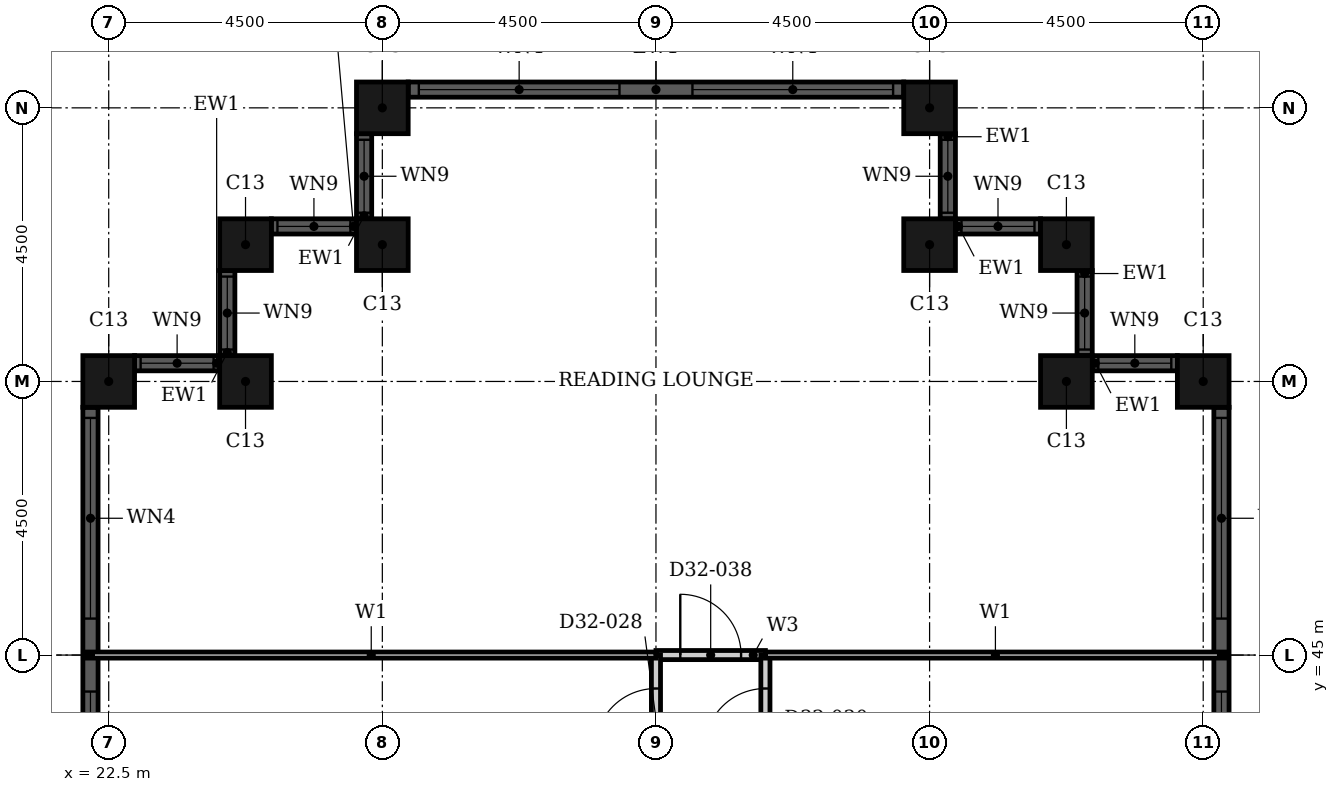
"""IFC4 building model, lengths in metres.
Left out: names, types, materials, properties, quantities, classifications, styles, units other than length and angle.
Written with IfcOpenShell. Run it as: python <this file> out.ifc"""

import sys

from ifc_helpers import new_model, si_unit, direction, frame, frame_2d, origin, origin_2d, place, context, subcontext, project, spatial, rectangle, hollow_rectangle, extrude, element, fill, save


model = new_model("IFC4")
c1 = context("Model", 3, precision=1e-05, world=origin(), true_north=direction((0.0, 1.0)))
c2 = subcontext(c1, "Body", "Model", "MODEL_VIEW")
j1 = project(units=[si_unit("LENGTHUNIT", "METRE"), si_unit("PLANEANGLEUNIT", "RADIAN")], contexts=[c1])
p1 = place(None, origin())
s1 = spatial("IfcSite", under=j1, at=p1, CompositionType="ELEMENT")
p2 = place(p1, origin())
s2 = spatial("IfcBuilding", under=s1, at=p2, CompositionType="ELEMENT")
p3 = place(p2, frame((0.0, 0.0, 129.6)))
s3 = spatial("IfcBuildingStorey", under=s2, at=p3, CompositionType="ELEMENT", Elevation=129.6)
for number, where, z_axis, x_axis in (
    (1, (40.5, 49.5, 0.0), (0.0, 0.0, 1.0), (1.0, 0.0, 0.0)),
    (2, (38.25, 49.5, 0.0), (0.0, 0.0, 1.0), (1.0, 0.0, 0.0)),
    (3, (38.25, 51.75, 0.0), (0.0, 0.0, 1.0), (1.0, 0.0, 0.0)),
    (4, (36.0, 51.75, 0.0), (0.0, 0.0, 1.0), (1.0, 0.0, 0.0)),
    (5, (36.0, 54.0, 0.0), (0.0, 0.0, 1.0), (1.0, 0.0, 0.0)),
    (6, (27.0, 54.0, 0.0), (0.0, 0.0, 1.0), (1.0, 0.0, 0.0)),
    (7, (27.0, 51.75, 0.0), (0.0, 0.0, 1.0), (1.0, 0.0, 0.0)),
    (8, (24.75, 51.75, 0.0), (0.0, 0.0, 1.0), (1.0, 0.0, 0.0)),
    (9, (24.75, 49.5, 0.0), (0.0, 0.0, 1.0), (1.0, 0.0, 0.0)),
    (10, (22.5, 49.5, 0.0), (0.0, 0.0, 1.0), (1.0, 0.0, 0.0)),
):
    element("IfcColumn", number, at=place(p3, frame(where, z_axis=z_axis, x_axis=x_axis)), inside=s3, PredefinedType="COLUMN", context=c2, shape_type="SweptSolid", body=[
        extrude(hollow_rectangle(XDim=0.85, YDim=0.85, WallThickness=0.026, at=origin_2d()), origin(), (0.0, 0.0, 1.0), 3.6),
    ])
p4 = place(p3, frame((40.8, 40.925, 0.0), z_axis=(0.0, 0.0, 1.0), x_axis=(0.0, 1.0, 0.0)))
e11 = element("IfcWall", 11, at=p4, inside=s3, PredefinedType="SOLIDWALL", context=c2, shape_type="SweptSolid", body=[
    extrude(rectangle(XDim=8.15, YDim=0.25, at=frame_2d((4.075, 0.0))), origin(), (0.0, 0.0, 1.0), 3.6),
])
p5 = place(p4, frame((0.175, 0.0, 0.9)))
e12 = element("IfcOpeningElement", 12, at=p5, cuts=e11, PredefinedType="OPENING", context=c2, shape_type="SweptSolid", body=[
    extrude(rectangle(XDim=3.3, YDim=2.08, at=frame_2d((1.65, 1.04))), frame((0.0, 0.135, 0.0), z_axis=(0.0, -1.0, 0.0), x_axis=(1.0, 0.0, 0.0)), (0.0, 0.0, 1.0), 0.27),
])
p6 = place(p4, frame((4.675, 0.0, 0.9)))
e13 = element("IfcOpeningElement", 13, at=p6, cuts=e11, PredefinedType="OPENING", context=c2, shape_type="SweptSolid", body=[
    extrude(rectangle(XDim=3.3, YDim=2.08, at=frame_2d((1.65, 1.04))), frame((0.0, 0.135, 0.0), z_axis=(0.0, -1.0, 0.0), x_axis=(1.0, 0.0, 0.0)), (0.0, 0.0, 1.0), 0.27),
])
p7 = place(p3, frame((40.075, 49.8, 0.0), z_axis=(0.0, 0.0, 1.0), x_axis=(-1.0, 0.0, 0.0)))
e14 = element("IfcWall", 14, at=p7, inside=s3, PredefinedType="SOLIDWALL", context=c2, shape_type="SweptSolid", body=[
    extrude(rectangle(XDim=1.4, YDim=0.25, at=frame_2d((0.7, 0.0))), origin(), (0.0, 0.0, 1.0), 3.6),
])
p8 = place(p7, frame((0.1, 0.0, 0.9)))
e15 = element("IfcOpeningElement", 15, at=p8, cuts=e14, PredefinedType="OPENING", context=c2, shape_type="SweptSolid", body=[
    extrude(rectangle(XDim=1.2, YDim=2.08, at=frame_2d((0.6, 1.04))), frame((0.0, 0.135, 0.0), z_axis=(0.0, -1.0, 0.0), x_axis=(1.0, 0.0, 0.0)), (0.0, 0.0, 1.0), 0.27),
])
p9 = place(p3, frame((38.55, 49.925, 0.0), z_axis=(0.0, 0.0, 1.0), x_axis=(0.0, 1.0, 0.0)))
e16 = element("IfcWall", 16, at=p9, inside=s3, PredefinedType="SOLIDWALL", context=c2, shape_type="SweptSolid", body=[
    extrude(rectangle(XDim=1.4, YDim=0.25, at=frame_2d((0.7, 0.0))), origin(), (0.0, 0.0, 1.0), 3.6),
])
p10 = place(p9, frame((0.1, 0.0, 0.9)))
e17 = element("IfcOpeningElement", 17, at=p10, cuts=e16, PredefinedType="OPENING", context=c2, shape_type="SweptSolid", body=[
    extrude(rectangle(XDim=1.2, YDim=2.08, at=frame_2d((0.6, 1.04))), frame((0.0, 0.135, 0.0), z_axis=(0.0, -1.0, 0.0), x_axis=(1.0, 0.0, 0.0)), (0.0, 0.0, 1.0), 0.27),
])
p11 = place(p3, frame((37.825, 52.05, 0.0), z_axis=(0.0, 0.0, 1.0), x_axis=(-1.0, 0.0, 0.0)))
e18 = element("IfcWall", 18, at=p11, inside=s3, PredefinedType="SOLIDWALL", context=c2, shape_type="SweptSolid", body=[
    extrude(rectangle(XDim=1.4, YDim=0.25, at=frame_2d((0.7, 0.0))), origin(), (0.0, 0.0, 1.0), 3.6),
])
p12 = place(p11, frame((0.1, 0.0, 0.9)))
e19 = element("IfcOpeningElement", 19, at=p12, cuts=e18, PredefinedType="OPENING", context=c2, shape_type="SweptSolid", body=[
    extrude(rectangle(XDim=1.2, YDim=2.08, at=frame_2d((0.6, 1.04))), frame((0.0, 0.135, 0.0), z_axis=(0.0, -1.0, 0.0), x_axis=(1.0, 0.0, 0.0)), (0.0, 0.0, 1.0), 0.27),
])
p13 = place(p3, frame((36.3, 52.175, 0.0), z_axis=(0.0, 0.0, 1.0), x_axis=(0.0, 1.0, 0.0)))
e20 = element("IfcWall", 20, at=p13, inside=s3, PredefinedType="SOLIDWALL", context=c2, shape_type="SweptSolid", body=[
    extrude(rectangle(XDim=1.4, YDim=0.25, at=frame_2d((0.7, 0.0))), origin(), (0.0, 0.0, 1.0), 3.6),
])
p14 = place(p13, frame((0.1, 0.0, 0.9)))
e21 = element("IfcOpeningElement", 21, at=p14, cuts=e20, PredefinedType="OPENING", context=c2, shape_type="SweptSolid", body=[
    extrude(rectangle(XDim=1.2, YDim=2.08, at=frame_2d((0.6, 1.04))), frame((0.0, 0.135, 0.0), z_axis=(0.0, -1.0, 0.0), x_axis=(1.0, 0.0, 0.0)), (0.0, 0.0, 1.0), 0.27),
])
p15 = place(p3, frame((35.575, 54.3, 0.0), z_axis=(0.0, 0.0, 1.0), x_axis=(-1.0, 0.0, 0.0)))
e22 = element("IfcWall", 22, at=p15, inside=s3, PredefinedType="SOLIDWALL", context=c2, shape_type="SweptSolid", body=[
    extrude(rectangle(XDim=8.15, YDim=0.25, at=frame_2d((4.075, 0.0))), origin(), (0.0, 0.0, 1.0), 3.6),
])
p16 = place(p15, frame((0.175, 0.0, 0.9)))
e23 = element("IfcOpeningElement", 23, at=p16, cuts=e22, PredefinedType="OPENING", context=c2, shape_type="SweptSolid", body=[
    extrude(rectangle(XDim=3.3, YDim=2.08, at=frame_2d((1.65, 1.04))), frame((0.0, 0.135, 0.0), z_axis=(0.0, -1.0, 0.0), x_axis=(1.0, 0.0, 0.0)), (0.0, 0.0, 1.0), 0.27),
])
p17 = place(p15, frame((4.675, 0.0, 0.9)))
e24 = element("IfcOpeningElement", 24, at=p17, cuts=e22, PredefinedType="OPENING", context=c2, shape_type="SweptSolid", body=[
    extrude(rectangle(XDim=3.3, YDim=2.08, at=frame_2d((1.65, 1.04))), frame((0.0, 0.135, 0.0), z_axis=(0.0, -1.0, 0.0), x_axis=(1.0, 0.0, 0.0)), (0.0, 0.0, 1.0), 0.27),
])
p18 = place(p3, frame((26.7, 53.575, 0.0), z_axis=(0.0, 0.0, 1.0), x_axis=(0.0, -1.0, 0.0)))
e25 = element("IfcWall", 25, at=p18, inside=s3, PredefinedType="SOLIDWALL", context=c2, shape_type="SweptSolid", body=[
    extrude(rectangle(XDim=1.4, YDim=0.25, at=frame_2d((0.7, 0.0))), origin(), (0.0, 0.0, 1.0), 3.6),
])
p19 = place(p18, frame((0.1, 0.0, 0.9)))
e26 = element("IfcOpeningElement", 26, at=p19, cuts=e25, PredefinedType="OPENING", context=c2, shape_type="SweptSolid", body=[
    extrude(rectangle(XDim=1.2, YDim=2.08, at=frame_2d((0.6, 1.04))), frame((0.0, 0.135, 0.0), z_axis=(0.0, -1.0, 0.0), x_axis=(1.0, 0.0, 0.0)), (0.0, 0.0, 1.0), 0.27),
])
p20 = place(p3, frame((26.575, 52.05, 0.0), z_axis=(0.0, 0.0, 1.0), x_axis=(-1.0, 0.0, 0.0)))
e27 = element("IfcWall", 27, at=p20, inside=s3, PredefinedType="SOLIDWALL", context=c2, shape_type="SweptSolid", body=[
    extrude(rectangle(XDim=1.4, YDim=0.25, at=frame_2d((0.7, 0.0))), origin(), (0.0, 0.0, 1.0), 3.6),
])
p21 = place(p20, frame((0.1, 0.0, 0.9)))
e28 = element("IfcOpeningElement", 28, at=p21, cuts=e27, PredefinedType="OPENING", context=c2, shape_type="SweptSolid", body=[
    extrude(rectangle(XDim=1.2, YDim=2.08, at=frame_2d((0.6, 1.04))), frame((0.0, 0.135, 0.0), z_axis=(0.0, -1.0, 0.0), x_axis=(1.0, 0.0, 0.0)), (0.0, 0.0, 1.0), 0.27),
])
p22 = place(p3, frame((24.45, 51.325, 0.0), z_axis=(0.0, 0.0, 1.0), x_axis=(0.0, -1.0, 0.0)))
e29 = element("IfcWall", 29, at=p22, inside=s3, PredefinedType="SOLIDWALL", context=c2, shape_type="SweptSolid", body=[
    extrude(rectangle(XDim=1.4, YDim=0.25, at=frame_2d((0.7, 0.0))), origin(), (0.0, 0.0, 1.0), 3.6),
])
p23 = place(p22, frame((0.1, 0.0, 0.9)))
e30 = element("IfcOpeningElement", 30, at=p23, cuts=e29, PredefinedType="OPENING", context=c2, shape_type="SweptSolid", body=[
    extrude(rectangle(XDim=1.2, YDim=2.08, at=frame_2d((0.6, 1.04))), frame((0.0, 0.135, 0.0), z_axis=(0.0, -1.0, 0.0), x_axis=(1.0, 0.0, 0.0)), (0.0, 0.0, 1.0), 0.27),
])
p24 = place(p3, frame((24.325, 49.8, 0.0), z_axis=(0.0, 0.0, 1.0), x_axis=(-1.0, 0.0, 0.0)))
e31 = element("IfcWall", 31, at=p24, inside=s3, PredefinedType="SOLIDWALL", context=c2, shape_type="SweptSolid", body=[
    extrude(rectangle(XDim=1.4, YDim=0.25, at=frame_2d((0.7, 0.0))), origin(), (0.0, 0.0, 1.0), 3.6),
])
p25 = place(p24, frame((0.1, 0.0, 0.9)))
e32 = element("IfcOpeningElement", 32, at=p25, cuts=e31, PredefinedType="OPENING", context=c2, shape_type="SweptSolid", body=[
    extrude(rectangle(XDim=1.2, YDim=2.08, at=frame_2d((0.6, 1.04))), frame((0.0, 0.135, 0.0), z_axis=(0.0, -1.0, 0.0), x_axis=(1.0, 0.0, 0.0)), (0.0, 0.0, 1.0), 0.27),
])
p26 = place(p3, frame((22.2, 49.075, 0.0), z_axis=(0.0, 0.0, 1.0), x_axis=(0.0, -1.0, 0.0)))
e33 = element("IfcWall", 33, at=p26, inside=s3, PredefinedType="SOLIDWALL", context=c2, shape_type="SweptSolid", body=[
    extrude(rectangle(XDim=8.15, YDim=0.25, at=frame_2d((4.075, 0.0))), origin(), (0.0, 0.0, 1.0), 3.6),
])
p27 = place(p26, frame((0.175, 0.0, 0.9)))
e34 = element("IfcOpeningElement", 34, at=p27, cuts=e33, PredefinedType="OPENING", context=c2, shape_type="SweptSolid", body=[
    extrude(rectangle(XDim=3.3, YDim=2.08, at=frame_2d((1.65, 1.04))), frame((0.0, 0.135, 0.0), z_axis=(0.0, -1.0, 0.0), x_axis=(1.0, 0.0, 0.0)), (0.0, 0.0, 1.0), 0.27),
])
p28 = place(p26, frame((4.675, 0.0, 0.9)))
e35 = element("IfcOpeningElement", 35, at=p28, cuts=e33, PredefinedType="OPENING", context=c2, shape_type="SweptSolid", body=[
    extrude(rectangle(XDim=3.3, YDim=2.08, at=frame_2d((1.65, 1.04))), frame((0.0, 0.135, 0.0), z_axis=(0.0, -1.0, 0.0), x_axis=(1.0, 0.0, 0.0)), (0.0, 0.0, 1.0), 0.27),
])
p29 = place(p3, frame((31.5, 45.0, 0.0), z_axis=(0.0, 0.0, 1.0), x_axis=(1.0, 0.0, 0.0)))
e36 = element("IfcWall", 36, at=p29, inside=s3, PredefinedType="PARTITIONING", context=c2, shape_type="SweptSolid", body=[
    extrude(rectangle(XDim=1.8, YDim=0.15, at=frame_2d((0.9, 0.0))), origin(), (0.0, 0.0, 1.0), 3.3),
])
p30 = place(p29, frame((0.4, 0.0, 0.0)))
e37 = element("IfcOpeningElement", 37, at=p30, cuts=e36, PredefinedType="OPENING", context=c2, shape_type="SweptSolid", body=[
    extrude(rectangle(XDim=1.0, YDim=2.1, at=frame_2d((0.5, 1.05))), frame((0.0, 0.085, 0.0), z_axis=(0.0, -1.0, 0.0), x_axis=(1.0, 0.0, 0.0)), (0.0, 0.0, 1.0), 0.17),
])
p31 = place(p3, frame((31.5, 33.3, 0.0), z_axis=(0.0, 0.0, 1.0), x_axis=(0.0, 1.0, 0.0)))
e38 = element("IfcWall", 38, at=p31, inside=s3, PredefinedType="PARTITIONING", context=c2, shape_type="SweptSolid", body=[
    extrude(rectangle(XDim=11.7, YDim=0.15, at=frame_2d((5.85, 0.0))), origin(), (0.0, 0.0, 1.0), 2.58),
])
p32 = place(p31, frame((10.15, 0.0, 0.0)))
e39 = element("IfcOpeningElement", 39, at=p32, cuts=e38, PredefinedType="OPENING", context=c2, shape_type="SweptSolid", body=[
    extrude(rectangle(XDim=1.0, YDim=2.1, at=frame_2d((0.5, 1.05))), frame((0.0, 0.085, 0.0), z_axis=(0.0, -1.0, 0.0), x_axis=(1.0, 0.0, 0.0)), (0.0, 0.0, 1.0), 0.17),
])
p33 = place(p3, frame((33.3, 33.3, 0.0), z_axis=(0.0, 0.0, 1.0), x_axis=(0.0, 1.0, 0.0)))
e40 = element("IfcWall", 40, at=p33, inside=s3, PredefinedType="PARTITIONING", context=c2, shape_type="SweptSolid", body=[
    extrude(rectangle(XDim=11.7, YDim=0.15, at=frame_2d((5.85, 0.0))), origin(), (0.0, 0.0, 1.0), 3.3),
])
p34 = place(p33, frame((10.15, 0.0, 0.0)))
e41 = element("IfcOpeningElement", 41, at=p34, cuts=e40, PredefinedType="OPENING", context=c2, shape_type="SweptSolid", body=[
    extrude(rectangle(XDim=1.0, YDim=2.1, at=frame_2d((0.5, 1.05))), frame((0.0, 0.085, 0.0), z_axis=(0.0, -1.0, 0.0), x_axis=(1.0, 0.0, 0.0)), (0.0, 0.0, 1.0), 0.17),
])
p35 = place(p3, frame((33.3, 45.0, 0.0), z_axis=(0.0, 0.0, 1.0), x_axis=(1.0, 0.0, 0.0)))
e42 = element("IfcWall", 42, at=p35, inside=s3, PredefinedType="PARTITIONING", context=c2, shape_type="SweptSolid", body=[
    extrude(rectangle(XDim=7.565, YDim=0.1, at=frame_2d((3.782, 0.0))), origin(), (0.0, 0.0, 1.0), 3.3),
])
p36 = place(p3, frame((22.135, 45.0, 0.0), z_axis=(0.0, 0.0, 1.0), x_axis=(1.0, 0.0, 0.0)))
e43 = element("IfcWall", 43, at=p36, inside=s3, PredefinedType="PARTITIONING", context=c2, shape_type="SweptSolid", body=[
    extrude(rectangle(XDim=9.365, YDim=0.1, at=frame_2d((4.683, 0.0))), origin(), (0.0, 0.0, 1.0), 3.3),
])
p37 = place(p5, origin())
e44 = element("IfcWindow", 44, at=p37, inside=s3, PartitioningType="SINGLE_PANEL", PredefinedType="WINDOW", context=c2, shape_type="SweptSolid", body=[
    extrude(rectangle(XDim=3.3, YDim=2.08, at=frame_2d((1.65, 1.04))), frame((0.0, 0.03, 0.0), z_axis=(0.0, -1.0, 0.0), x_axis=(1.0, 0.0, 0.0)), (0.0, 0.0, 1.0), 0.06),
])
fill(e12, e44)
p38 = place(p6, origin())
e45 = element("IfcWindow", 45, at=p38, inside=s3, PartitioningType="SINGLE_PANEL", PredefinedType="WINDOW", context=c2, shape_type="SweptSolid", body=[
    extrude(rectangle(XDim=3.3, YDim=2.08, at=frame_2d((1.65, 1.04))), frame((0.0, 0.03, 0.0), z_axis=(0.0, -1.0, 0.0), x_axis=(1.0, 0.0, 0.0)), (0.0, 0.0, 1.0), 0.06),
])
fill(e13, e45)
p39 = place(p8, origin())
e46 = element("IfcWindow", 46, at=p39, inside=s3, PartitioningType="SINGLE_PANEL", PredefinedType="WINDOW", context=c2, shape_type="SweptSolid", body=[
    extrude(rectangle(XDim=1.2, YDim=2.08, at=frame_2d((0.6, 1.04))), frame((0.0, 0.03, 0.0), z_axis=(0.0, -1.0, 0.0), x_axis=(1.0, 0.0, 0.0)), (0.0, 0.0, 1.0), 0.06),
])
fill(e15, e46)
p40 = place(p10, origin())
e47 = element("IfcWindow", 47, at=p40, inside=s3, PartitioningType="SINGLE_PANEL", PredefinedType="WINDOW", context=c2, shape_type="SweptSolid", body=[
    extrude(rectangle(XDim=1.2, YDim=2.08, at=frame_2d((0.6, 1.04))), frame((0.0, 0.03, 0.0), z_axis=(0.0, -1.0, 0.0), x_axis=(1.0, 0.0, 0.0)), (0.0, 0.0, 1.0), 0.06),
])
fill(e17, e47)
p41 = place(p12, origin())
e48 = element("IfcWindow", 48, at=p41, inside=s3, PartitioningType="SINGLE_PANEL", PredefinedType="WINDOW", context=c2, shape_type="SweptSolid", body=[
    extrude(rectangle(XDim=1.2, YDim=2.08, at=frame_2d((0.6, 1.04))), frame((0.0, 0.03, 0.0), z_axis=(0.0, -1.0, 0.0), x_axis=(1.0, 0.0, 0.0)), (0.0, 0.0, 1.0), 0.06),
])
fill(e19, e48)
p42 = place(p14, origin())
e49 = element("IfcWindow", 49, at=p42, inside=s3, PartitioningType="SINGLE_PANEL", PredefinedType="WINDOW", context=c2, shape_type="SweptSolid", body=[
    extrude(rectangle(XDim=1.2, YDim=2.08, at=frame_2d((0.6, 1.04))), frame((0.0, 0.03, 0.0), z_axis=(0.0, -1.0, 0.0), x_axis=(1.0, 0.0, 0.0)), (0.0, 0.0, 1.0), 0.06),
])
fill(e21, e49)
p43 = place(p16, origin())
e50 = element("IfcWindow", 50, at=p43, inside=s3, PartitioningType="SINGLE_PANEL", PredefinedType="WINDOW", context=c2, shape_type="SweptSolid", body=[
    extrude(rectangle(XDim=3.3, YDim=2.08, at=frame_2d((1.65, 1.04))), frame((0.0, 0.03, 0.0), z_axis=(0.0, -1.0, 0.0), x_axis=(1.0, 0.0, 0.0)), (0.0, 0.0, 1.0), 0.06),
])
fill(e23, e50)
p44 = place(p17, origin())
e51 = element("IfcWindow", 51, at=p44, inside=s3, PartitioningType="SINGLE_PANEL", PredefinedType="WINDOW", context=c2, shape_type="SweptSolid", body=[
    extrude(rectangle(XDim=3.3, YDim=2.08, at=frame_2d((1.65, 1.04))), frame((0.0, 0.03, 0.0), z_axis=(0.0, -1.0, 0.0), x_axis=(1.0, 0.0, 0.0)), (0.0, 0.0, 1.0), 0.06),
])
fill(e24, e51)
p45 = place(p19, origin())
e52 = element("IfcWindow", 52, at=p45, inside=s3, PartitioningType="SINGLE_PANEL", PredefinedType="WINDOW", context=c2, shape_type="SweptSolid", body=[
    extrude(rectangle(XDim=1.2, YDim=2.08, at=frame_2d((0.6, 1.04))), frame((0.0, 0.03, 0.0), z_axis=(0.0, -1.0, 0.0), x_axis=(1.0, 0.0, 0.0)), (0.0, 0.0, 1.0), 0.06),
])
fill(e26, e52)
p46 = place(p21, origin())
e53 = element("IfcWindow", 53, at=p46, inside=s3, PartitioningType="SINGLE_PANEL", PredefinedType="WINDOW", context=c2, shape_type="SweptSolid", body=[
    extrude(rectangle(XDim=1.2, YDim=2.08, at=frame_2d((0.6, 1.04))), frame((0.0, 0.03, 0.0), z_axis=(0.0, -1.0, 0.0), x_axis=(1.0, 0.0, 0.0)), (0.0, 0.0, 1.0), 0.06),
])
fill(e28, e53)
p47 = place(p23, origin())
e54 = element("IfcWindow", 54, at=p47, inside=s3, PartitioningType="SINGLE_PANEL", PredefinedType="WINDOW", context=c2, shape_type="SweptSolid", body=[
    extrude(rectangle(XDim=1.2, YDim=2.08, at=frame_2d((0.6, 1.04))), frame((0.0, 0.03, 0.0), z_axis=(0.0, -1.0, 0.0), x_axis=(1.0, 0.0, 0.0)), (0.0, 0.0, 1.0), 0.06),
])
fill(e30, e54)
p48 = place(p25, origin())
e55 = element("IfcWindow", 55, at=p48, inside=s3, PartitioningType="SINGLE_PANEL", PredefinedType="WINDOW", context=c2, shape_type="SweptSolid", body=[
    extrude(rectangle(XDim=1.2, YDim=2.08, at=frame_2d((0.6, 1.04))), frame((0.0, 0.03, 0.0), z_axis=(0.0, -1.0, 0.0), x_axis=(1.0, 0.0, 0.0)), (0.0, 0.0, 1.0), 0.06),
])
fill(e32, e55)
p49 = place(p27, origin())
e56 = element("IfcWindow", 56, at=p49, inside=s3, PartitioningType="SINGLE_PANEL", PredefinedType="WINDOW", context=c2, shape_type="SweptSolid", body=[
    extrude(rectangle(XDim=3.3, YDim=2.08, at=frame_2d((1.65, 1.04))), frame((0.0, 0.03, 0.0), z_axis=(0.0, -1.0, 0.0), x_axis=(1.0, 0.0, 0.0)), (0.0, 0.0, 1.0), 0.06),
])
fill(e34, e56)
p50 = place(p28, origin())
e57 = element("IfcWindow", 57, at=p50, inside=s3, PartitioningType="SINGLE_PANEL", PredefinedType="WINDOW", context=c2, shape_type="SweptSolid", body=[
    extrude(rectangle(XDim=3.3, YDim=2.08, at=frame_2d((1.65, 1.04))), frame((0.0, 0.03, 0.0), z_axis=(0.0, -1.0, 0.0), x_axis=(1.0, 0.0, 0.0)), (0.0, 0.0, 1.0), 0.06),
])
fill(e35, e57)
p51 = place(p32, origin())
e58 = element("IfcDoor", 58, at=p51, inside=s3, OperationType="SINGLE_SWING_RIGHT", PredefinedType="DOOR", context=c2, shape_type="SweptSolid", body=[
    extrude(rectangle(XDim=1.0, YDim=2.1, at=frame_2d((0.5, 1.05))), frame((0.0, 0.025, 0.0), z_axis=(0.0, -1.0, 0.0), x_axis=(1.0, 0.0, 0.0)), (0.0, 0.0, 1.0), 0.05),
])
fill(e39, e58)
p52 = place(p34, origin())
e59 = element("IfcDoor", 59, at=p52, inside=s3, OperationType="SINGLE_SWING_RIGHT", PredefinedType="DOOR", context=c2, shape_type="SweptSolid", body=[
    extrude(rectangle(XDim=1.0, YDim=2.1, at=frame_2d((0.5, 1.05))), frame((0.0, 0.025, 0.0), z_axis=(0.0, -1.0, 0.0), x_axis=(1.0, 0.0, 0.0)), (0.0, 0.0, 1.0), 0.05),
])
fill(e41, e59)
p53 = place(p30, origin())
e60 = element("IfcDoor", 60, at=p53, inside=s3, OperationType="SINGLE_SWING_LEFT", PredefinedType="DOOR", context=c2, shape_type="SweptSolid", body=[
    extrude(rectangle(XDim=1.0, YDim=2.1, at=frame_2d((0.5, 1.05))), frame((0.0, 0.025, 0.0), z_axis=(0.0, -1.0, 0.0), x_axis=(1.0, 0.0, 0.0)), (0.0, 0.0, 1.0), 0.05),
])
fill(e37, e60)
save(model, sys.argv[1])
